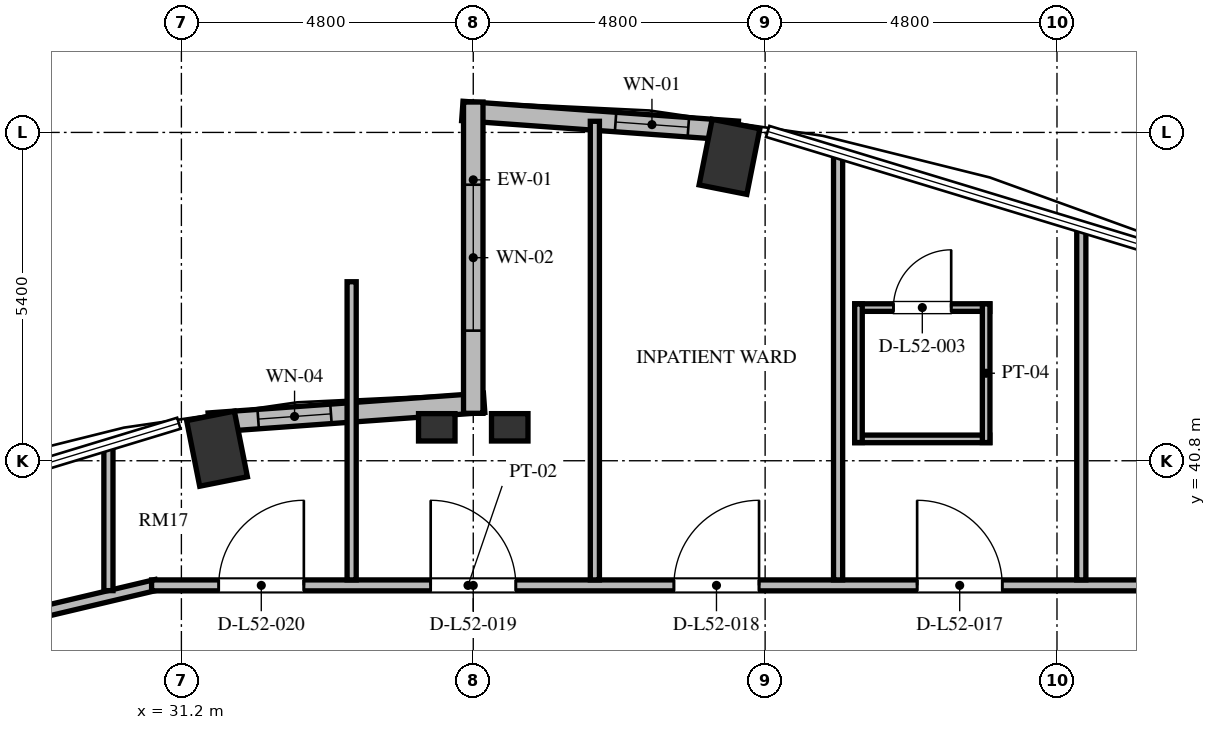
"""IFC4 building model, lengths in metres.
Left out: names, types, materials, properties, quantities, classifications, styles, units other than length and angle.
Written with IfcOpenShell. Run it as: python <this file> out.ifc"""

import sys

from ifc_helpers import new_model, si_unit, direction, frame, frame_2d, origin, origin_2d, place, context, subcontext, project, spatial, rectangle, extrude, element, fill, save


model = new_model("IFC4")
c1 = context("Model", 3, precision=1e-05, world=origin(), true_north=direction((0.0, 1.0)))
c2 = subcontext(c1, "Body", "Model", "MODEL_VIEW")
j1 = project(units=[si_unit("LENGTHUNIT", "METRE"), si_unit("PLANEANGLEUNIT", "RADIAN")], contexts=[c1])
p1 = place(None, origin())
s1 = spatial("IfcSite", under=j1, at=p1, CompositionType="ELEMENT")
p2 = place(p1, origin())
s2 = spatial("IfcBuilding", under=s1, at=p2, CompositionType="ELEMENT")
p3 = place(p2, frame((0.0, 0.0, 202.128)))
s3 = spatial("IfcBuildingStorey", under=s2, at=p3, CompositionType="ELEMENT", Elevation=202.128)
for number, where, z_axis, x_axis in (
    (1, (40.214, 45.798, 0.0), (0.0, 0.0, 1.0), (0.195, 0.981, 0.0)),
    (2, (31.786, 40.998, 0.0), (0.0, 0.0, 1.0), (-0.195, 0.981, 0.0)),
):
    element("IfcColumn", number, at=place(p3, frame(where, z_axis=z_axis, x_axis=x_axis)), inside=s3, PredefinedType="COLUMN", context=c2, shape_type="SweptSolid", body=[
        extrude(rectangle(XDim=1.1, YDim=0.8, at=origin_2d()), origin(), (0.0, 0.0, 1.0), 3.648),
    ])
for number, where, z_axis, x_axis in (
    (3, (35.4, 41.35, 0.0), (0.0, 0.0, 1.0), (1.0, 0.0, 0.0)),
    (4, (36.6, 41.35, 0.0), (0.0, 0.0, 1.0), (1.0, 0.0, 0.0)),
):
    element("IfcColumn", number, at=place(p3, frame(where, z_axis=z_axis, x_axis=x_axis)), inside=s3, PredefinedType="PILASTER", context=c2, shape_type="SweptSolid", body=[
        extrude(rectangle(XDim=0.6, YDim=0.45, at=origin_2d()), origin(), (0.0, 0.0, 1.0), 3.648),
    ])
p4 = place(p3, frame((40.35, 46.226, 0.0), z_axis=(0.0, 0.0, 1.0), x_axis=(-0.997409061056, 0.071938619141, 0.0)))
e5 = element("IfcWall", 5, at=p4, inside=s3, PredefinedType="SOLIDWALL", context=c2, shape_type="SweptSolid", body=[
    extrude(rectangle(XDim=4.541, YDim=0.32, at=frame_2d((2.271, 0.0))), origin(), (0.0, 0.0, 1.0), 3.448),
])
p5 = place(p4, frame((0.815, 0.0, 0.85)))
e6 = element("IfcOpeningElement", 6, at=p5, cuts=e5, PredefinedType="OPENING", context=c2, shape_type="SweptSolid", body=[
    extrude(rectangle(XDim=1.2, YDim=2.2, at=frame_2d((0.6, 1.1))), frame((0.0, 0.17, 0.0), z_axis=(0.0, -1.0, 0.0), x_axis=(1.0, 0.0, 0.0)), (0.0, 0.0, 1.0), 0.34),
])
p6 = place(p3, frame((36.179, 41.753, 0.0), z_axis=(0.0, 0.0, 1.0), x_axis=(-0.997408782787, -0.071942477163, 0.0)))
e7 = element("IfcWall", 7, at=p6, inside=s3, PredefinedType="SOLIDWALL", context=c2, shape_type="SweptSolid", body=[
    extrude(rectangle(XDim=4.541, YDim=0.32, at=frame_2d((2.27, 0.0))), origin(), (0.0, 0.0, 1.0), 3.448),
])
p7 = place(p6, frame((2.526, 0.0, 0.85)))
e8 = element("IfcOpeningElement", 8, at=p7, cuts=e7, PredefinedType="OPENING", context=c2, shape_type="SweptSolid", body=[
    extrude(rectangle(XDim=1.2, YDim=1.8, at=frame_2d((0.6, 0.9))), frame((0.0, 0.17, 0.0), z_axis=(0.0, -1.0, 0.0), x_axis=(1.0, 0.0, 0.0)), (0.0, 0.0, 1.0), 0.34),
])
p8 = place(p3, frame((36.0, 46.7, 0.0), z_axis=(0.0, 0.0, 1.0), x_axis=(0.0, -1.0, 0.0)))
e9 = element("IfcWall", 9, at=p8, inside=s3, PredefinedType="SOLIDWALL", context=c2, shape_type="SweptSolid", body=[
    extrude(rectangle(XDim=5.12, YDim=0.32, at=frame_2d((2.56, 0.0))), origin(), (0.0, 0.0, 1.0), 3.448),
])
p9 = place(p8, frame((1.36, 0.0, 0.84)))
e10 = element("IfcOpeningElement", 10, at=p9, cuts=e9, PredefinedType="OPENING", context=c2, shape_type="SweptSolid", body=[
    extrude(rectangle(XDim=2.4, YDim=2.04, at=frame_2d((1.2, 1.02))), frame((0.0, 0.17, 0.0), z_axis=(0.0, -1.0, 0.0), x_axis=(1.0, 0.0, 0.0)), (0.0, 0.0, 1.0), 0.34),
])
p10 = place(p3, frame((28.476, 38.211, 0.0), z_axis=(0.0, 0.0, 1.0), x_axis=(0.973030562203, 0.230676234189, 0.0)))
e11 = element("IfcWall", 11, at=p10, inside=s3, PredefinedType="PARTITIONING", context=c2, shape_type="SweptSolid", body=[
    extrude(rectangle(XDim=2.377, YDim=0.18, at=frame_2d((1.188, 0.0))), origin(), (0.0, 0.0, 1.0), 3.448),
])
p11 = place(p3, frame((30.71, 38.75, 0.0), z_axis=(0.0, 0.0, 1.0), x_axis=(1.0, 0.0, 0.0)))
e12 = element("IfcWall", 12, at=p11, inside=s3, PredefinedType="PARTITIONING", context=c2, shape_type="SweptSolid", body=[
    extrude(rectangle(XDim=20.815, YDim=0.18, at=frame_2d((10.408, 0.0))), origin(), (0.0, 0.0, 1.0), 3.073),
])
p12 = place(p11, frame((17.194, 0.0, 0.0)))
e13 = element("IfcOpeningElement", 13, at=p12, cuts=e12, PredefinedType="OPENING", context=c2, shape_type="SweptSolid", body=[
    extrude(rectangle(XDim=1.4, YDim=2.2, at=frame_2d((0.7, 1.1))), frame((0.0, 0.1, 0.0), z_axis=(0.0, -1.0, 0.0), x_axis=(1.0, 0.0, 0.0)), (0.0, 0.0, 1.0), 0.2),
])
p13 = place(p11, frame((12.59, 0.0, 0.0)))
e14 = element("IfcOpeningElement", 14, at=p13, cuts=e12, PredefinedType="OPENING", context=c2, shape_type="SweptSolid", body=[
    extrude(rectangle(XDim=1.4, YDim=2.2, at=frame_2d((0.7, 1.1))), frame((0.0, 0.1, 0.0), z_axis=(0.0, -1.0, 0.0), x_axis=(1.0, 0.0, 0.0)), (0.0, 0.0, 1.0), 0.2),
])
p14 = place(p11, frame((8.59, 0.0, 0.0)))
e15 = element("IfcOpeningElement", 15, at=p14, cuts=e12, PredefinedType="OPENING", context=c2, shape_type="SweptSolid", body=[
    extrude(rectangle(XDim=1.4, YDim=2.2, at=frame_2d((0.7, 1.1))), frame((0.0, 0.1, 0.0), z_axis=(0.0, -1.0, 0.0), x_axis=(1.0, 0.0, 0.0)), (0.0, 0.0, 1.0), 0.2),
])
p15 = place(p11, frame((4.59, 0.0, 0.0)))
e16 = element("IfcOpeningElement", 16, at=p15, cuts=e12, PredefinedType="OPENING", context=c2, shape_type="SweptSolid", body=[
    extrude(rectangle(XDim=1.4, YDim=2.2, at=frame_2d((0.7, 1.1))), frame((0.0, 0.1, 0.0), z_axis=(0.0, -1.0, 0.0), x_axis=(1.0, 0.0, 0.0)), (0.0, 0.0, 1.0), 0.2),
])
p16 = place(p11, frame((1.104, 0.0, 0.0)))
e17 = element("IfcOpeningElement", 17, at=p16, cuts=e12, PredefinedType="OPENING", context=c2, shape_type="SweptSolid", body=[
    extrude(rectangle(XDim=1.4, YDim=2.2, at=frame_2d((0.7, 1.1))), frame((0.0, 0.1, 0.0), z_axis=(0.0, -1.0, 0.0), x_axis=(1.0, 0.0, 0.0)), (0.0, 0.0, 1.0), 0.2),
])
p17 = place(p3, frame((30.0, 38.664, 0.0), z_axis=(0.0, 0.0, 1.0), x_axis=(0.0, 1.0, 0.0)))
e18 = element("IfcWall", 18, at=p17, inside=s3, PredefinedType="PARTITIONING", context=c2, shape_type="SweptSolid", body=[
    extrude(rectangle(XDim=2.384, YDim=0.15, at=frame_2d((1.192, 0.0))), origin(), (0.0, 0.0, 1.0), 3.448),
])
p18 = place(p3, frame((34.0, 38.84, 0.0), z_axis=(0.0, 0.0, 1.0), x_axis=(0.0, 1.0, 0.0)))
e19 = element("IfcWall", 19, at=p18, inside=s3, PredefinedType="PARTITIONING", context=c2, shape_type="SweptSolid", body=[
    extrude(rectangle(XDim=4.904, YDim=0.15, at=frame_2d((2.452, 0.0))), origin(), (0.0, 0.0, 1.0), 3.448),
])
p19 = place(p3, frame((38.0, 38.84, 0.0), z_axis=(0.0, 0.0, 1.0), x_axis=(0.0, 1.0, 0.0)))
e20 = element("IfcWall", 20, at=p19, inside=s3, PredefinedType="PARTITIONING", context=c2, shape_type="SweptSolid", body=[
    extrude(rectangle(XDim=7.543, YDim=0.15, at=frame_2d((3.771, 0.0))), origin(), (0.0, 0.0, 1.0), 3.448),
])
p20 = place(p3, frame((42.0, 38.84, 0.0), z_axis=(0.0, 0.0, 1.0), x_axis=(0.0, 1.0, 0.0)))
e21 = element("IfcWall", 21, at=p20, inside=s3, PredefinedType="PARTITIONING", context=c2, shape_type="SweptSolid", body=[
    extrude(rectangle(XDim=7.008, YDim=0.15, at=frame_2d((3.504, 0.0))), origin(), (0.0, 0.0, 1.0), 3.448),
])
p21 = place(p3, frame((46.0, 38.84, 0.0), z_axis=(0.0, 0.0, 1.0), x_axis=(0.0, 1.0, 0.0)))
e22 = element("IfcWall", 22, at=p21, inside=s3, PredefinedType="PARTITIONING", context=c2, shape_type="SweptSolid", body=[
    extrude(rectangle(XDim=5.793, YDim=0.15, at=frame_2d((2.896, 0.0))), origin(), (0.0, 0.0, 1.0), 3.448),
])
p22 = place(p3, frame((42.275, 43.319, 0.0), z_axis=(0.0, 0.0, 1.0), x_axis=(1.0, 0.0, 0.0)))
e23 = element("IfcWall", 23, at=p22, inside=s3, PredefinedType="PARTITIONING", context=c2, shape_type="SweptSolid", body=[
    extrude(rectangle(XDim=2.22, YDim=0.125, at=frame_2d((1.11, 0.0))), origin(), (0.0, 0.0, 1.0), 3.448),
])
p23 = place(p22, frame((0.635, 0.0, 0.0)))
e24 = element("IfcOpeningElement", 24, at=p23, cuts=e23, PredefinedType="OPENING", context=c2, shape_type="SweptSolid", body=[
    extrude(rectangle(XDim=0.95, YDim=2.1, at=frame_2d((0.475, 1.05))), frame((0.0, 0.073, 0.0), z_axis=(0.0, -1.0, 0.0), x_axis=(1.0, 0.0, 0.0)), (0.0, 0.0, 1.0), 0.145),
])
p24 = place(p3, frame((42.275, 41.159, 0.0), z_axis=(0.0, 0.0, 1.0), x_axis=(1.0, 0.0, 0.0)))
e25 = element("IfcWall", 25, at=p24, inside=s3, PredefinedType="PARTITIONING", context=c2, shape_type="SweptSolid", body=[
    extrude(rectangle(XDim=2.22, YDim=0.125, at=frame_2d((1.11, 0.0))), origin(), (0.0, 0.0, 1.0), 3.073),
])
for number, where, z_axis, x_axis in (
    (26, (44.435, 41.099, 0.0), (0.0, 0.0, 1.0), (0.0, 1.0, 0.0)),
    (27, (42.335, 41.099, 0.0), (0.0, 0.0, 1.0), (0.0, 1.0, 0.0)),
):
    element("IfcWall", number, at=place(p3, frame(where, z_axis=z_axis, x_axis=x_axis)), inside=s3, PredefinedType="PARTITIONING", context=c2, shape_type="SweptSolid", body=[
        extrude(rectangle(XDim=2.28, YDim=0.125, at=frame_2d((1.14, 0.0))), origin(), (0.0, 0.0, 1.0), 3.448),
    ])
p25 = place(p5, origin())
e28 = element("IfcWindow", 28, at=p25, inside=s3, PartitioningType="SINGLE_PANEL", PredefinedType="WINDOW", context=c2, shape_type="SweptSolid", body=[
    extrude(rectangle(XDim=1.2, YDim=2.2, at=frame_2d((0.6, 1.1))), frame((0.0, 0.03, 0.0), z_axis=(0.0, -1.0, 0.0), x_axis=(1.0, 0.0, 0.0)), (0.0, 0.0, 1.0), 0.06),
])
fill(e6, e28)
p26 = place(p7, origin())
e29 = element("IfcWindow", 29, at=p26, inside=s3, PartitioningType="SINGLE_PANEL", PredefinedType="WINDOW", context=c2, shape_type="SweptSolid", body=[
    extrude(rectangle(XDim=1.2, YDim=1.8, at=frame_2d((0.6, 0.9))), frame((0.0, 0.03, 0.0), z_axis=(0.0, -1.0, 0.0), x_axis=(1.0, 0.0, 0.0)), (0.0, 0.0, 1.0), 0.06),
])
fill(e8, e29)
p27 = place(p9, origin())
e30 = element("IfcWindow", 30, at=p27, inside=s3, PartitioningType="SINGLE_PANEL", PredefinedType="WINDOW", context=c2, shape_type="SweptSolid", body=[
    extrude(rectangle(XDim=2.4, YDim=2.04, at=frame_2d((1.2, 1.02))), frame((0.0, 0.03, 0.0), z_axis=(0.0, -1.0, 0.0), x_axis=(1.0, 0.0, 0.0)), (0.0, 0.0, 1.0), 0.06),
])
fill(e10, e30)
p28 = place(p23, origin())
e31 = element("IfcDoor", 31, at=p28, inside=s3, OperationType="SINGLE_SWING_RIGHT", PredefinedType="DOOR", context=c2, shape_type="SweptSolid", body=[
    extrude(rectangle(XDim=0.95, YDim=2.1, at=frame_2d((0.475, 1.05))), frame((0.0, 0.025, 0.0), z_axis=(0.0, -1.0, 0.0), x_axis=(1.0, 0.0, 0.0)), (0.0, 0.0, 1.0), 0.05),
])
fill(e24, e31)
p29 = place(p13, origin())
e32 = element("IfcDoor", 32, at=p29, inside=s3, OperationType="SINGLE_SWING_LEFT", PredefinedType="DOOR", context=c2, shape_type="SweptSolid", body=[
    extrude(rectangle(XDim=1.4, YDim=2.2, at=frame_2d((0.7, 1.1))), frame((0.0, 0.025, 0.0), z_axis=(0.0, -1.0, 0.0), x_axis=(1.0, 0.0, 0.0)), (0.0, 0.0, 1.0), 0.05),
])
fill(e14, e32)
p30 = place(p14, origin())
e33 = element("IfcDoor", 33, at=p30, inside=s3, OperationType="SINGLE_SWING_RIGHT", PredefinedType="DOOR", context=c2, shape_type="SweptSolid", body=[
    extrude(rectangle(XDim=1.4, YDim=2.2, at=frame_2d((0.7, 1.1))), frame((0.0, 0.025, 0.0), z_axis=(0.0, -1.0, 0.0), x_axis=(1.0, 0.0, 0.0)), (0.0, 0.0, 1.0), 0.05),
])
fill(e15, e33)
p31 = place(p15, origin())
e34 = element("IfcDoor", 34, at=p31, inside=s3, OperationType="SINGLE_SWING_LEFT", PredefinedType="DOOR", context=c2, shape_type="SweptSolid", body=[
    extrude(rectangle(XDim=1.4, YDim=2.2, at=frame_2d((0.7, 1.1))), frame((0.0, 0.025, 0.0), z_axis=(0.0, -1.0, 0.0), x_axis=(1.0, 0.0, 0.0)), (0.0, 0.0, 1.0), 0.05),
])
fill(e16, e34)
p32 = place(p16, origin())
e35 = element("IfcDoor", 35, at=p32, inside=s3, OperationType="SINGLE_SWING_RIGHT", PredefinedType="DOOR", context=c2, shape_type="SweptSolid", body=[
    extrude(rectangle(XDim=1.4, YDim=2.2, at=frame_2d((0.7, 1.1))), frame((0.0, 0.025, 0.0), z_axis=(0.0, -1.0, 0.0), x_axis=(1.0, 0.0, 0.0)), (0.0, 0.0, 1.0), 0.05),
])
fill(e17, e35)
save(model, sys.argv[1])
